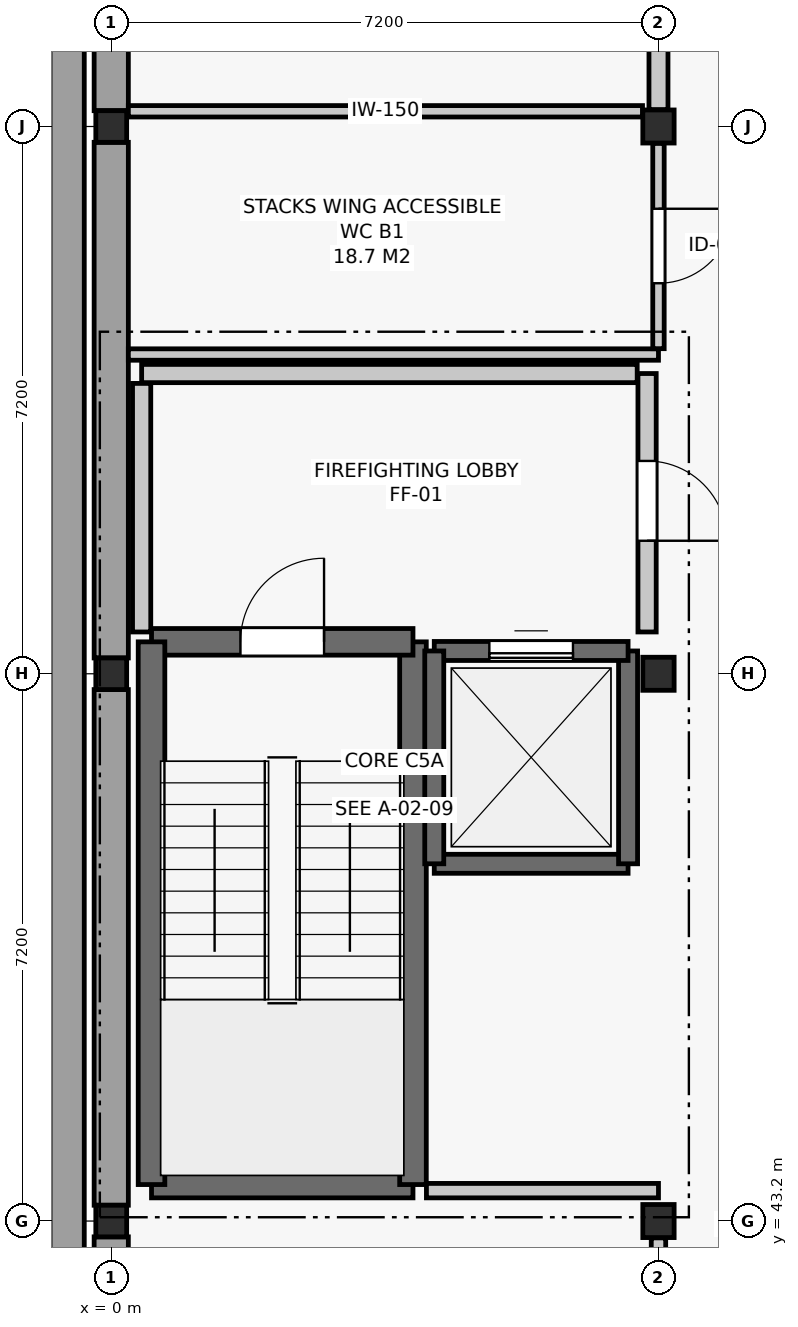
"""IFC4 building model, lengths in metres.
Left out: names, types, materials, properties, quantities, classifications, styles, units other than length and angle.
Written with IfcOpenShell. Run it as: python <this file> out.ifc"""

import sys

from ifc_helpers import new_model, si_unit, direction, frame, frame_2d, origin, origin_2d, place, context, subcontext, project, spatial, rectangle, i_section, extrude, element, fill, save


model = new_model("IFC4")
c1 = context("Model", 3, precision=1e-05, world=origin(), true_north=direction((0.0, 1.0)))
c2 = subcontext(c1, "Body", "Model", "MODEL_VIEW")
j1 = project(units=[si_unit("LENGTHUNIT", "METRE"), si_unit("PLANEANGLEUNIT", "RADIAN")], contexts=[c1])
p1 = place(None, origin())
s1 = spatial("IfcSite", under=j1, at=p1, CompositionType="ELEMENT")
p2 = place(p1, origin())
s2 = spatial("IfcBuilding", under=s1, at=p2, CompositionType="ELEMENT")
p3 = place(p2, frame((0.0, 0.0, -4.2)))
s3 = spatial("IfcBuildingStorey", under=s2, at=p3, CompositionType="ELEMENT", Elevation=-4.2)
for number, where, z_axis, x_axis in (
    (1, (0.0, 43.2, 0.0), (0.0, 0.0, 1.0), (1.0, 0.0, 0.0)),
    (2, (0.0, 50.4, 0.0), (0.0, 0.0, 1.0), (1.0, 0.0, 0.0)),
    (3, (0.0, 57.6, 0.0), (0.0, 0.0, 1.0), (1.0, 0.0, 0.0)),
):
    element("IfcColumn", number, at=place(p3, frame(where, z_axis=z_axis, x_axis=x_axis)), inside=s3, PredefinedType="COLUMN", context=c2, shape_type="SweptSolid", body=[
        extrude(i_section(OverallWidth=0.406, OverallDepth=0.416, WebThickness=0.021, FlangeThickness=0.034, FilletRadius=0.015, at=origin_2d()), origin(), (0.0, 0.0, 1.0), 4.2),
    ])
for number, where, z_axis, x_axis in (
    (4, (7.2, 43.2, 0.0), (0.0, 0.0, 1.0), (1.0, 0.0, 0.0)),
    (5, (7.2, 50.4, 0.0), (0.0, 0.0, 1.0), (1.0, 0.0, 0.0)),
    (6, (7.2, 57.6, 0.0), (0.0, 0.0, 1.0), (1.0, 0.0, 0.0)),
):
    element("IfcColumn", number, at=place(p3, frame(where, z_axis=z_axis, x_axis=x_axis)), inside=s3, PredefinedType="COLUMN", context=c2, shape_type="SweptSolid", body=[
        extrude(i_section(OverallWidth=0.412, OverallDepth=0.435, WebThickness=0.025, FlangeThickness=0.042, FilletRadius=0.015, at=origin_2d()), origin(), (0.0, 0.0, 1.0), 4.2),
    ])
for number, where, z_axis, x_axis in (
    (7, (0.0, 36.208, 0.0), (0.0, 0.0, 1.0), (0.0, 1.0, 0.0)),
    (8, (0.0, 43.408, 0.0), (0.0, 0.0, 1.0), (0.0, 1.0, 0.0)),
):
    element("IfcWall", number, at=place(p3, frame(where, z_axis=z_axis, x_axis=x_axis)), inside=s3, PredefinedType="USERDEFINED", context=c2, shape_type="SweptSolid", body=[
        extrude(rectangle(XDim=6.784, YDim=0.45, at=frame_2d((3.392, 0.0))), origin(), (0.0, 0.0, 1.0), 3.26),
    ])
p4 = place(p3, frame((0.0, 50.608, 0.0), z_axis=(0.0, 0.0, 1.0), x_axis=(0.0, 1.0, 0.0)))
e9 = element("IfcWall", 9, at=p4, inside=s3, PredefinedType="USERDEFINED", context=c2, shape_type="SweptSolid", body=[
    extrude(rectangle(XDim=6.784, YDim=0.45, at=frame_2d((3.392, 0.0))), origin(), (0.0, 0.0, 1.0), 3.26),
])
p5 = place(p3, frame((0.0, 57.808, 0.0), z_axis=(0.0, 0.0, 1.0), x_axis=(0.0, 1.0, 0.0)))
e10 = element("IfcWall", 10, at=p5, inside=s3, PredefinedType="USERDEFINED", context=c2, shape_type="SweptSolid", body=[
    extrude(rectangle(XDim=6.784, YDim=0.45, at=frame_2d((3.392, 0.0))), origin(), (0.0, 0.0, 1.0), 3.26),
])
p6 = place(p3, frame((-0.58, 28.8, -0.6), z_axis=(0.0, 0.0, 1.0), x_axis=(0.0, 1.0, 0.0)))
e11 = element("IfcWall", 11, at=p6, inside=s3, PredefinedType="USERDEFINED", context=c2, shape_type="SweptSolid", body=[
    extrude(rectangle(XDim=79.2, YDim=0.45, at=frame_2d((39.6, 0.0))), origin(), (0.0, 0.0, 1.0), 4.48),
])
p7 = place(p3, frame((0.53, 43.68, 0.0), z_axis=(0.0, 0.0, 1.0), x_axis=(1.0, 0.0, 0.0)))
e12 = element("IfcWall", 12, at=p7, inside=s3, PredefinedType="SHEAR", context=c2, shape_type="SweptSolid", body=[
    extrude(rectangle(XDim=3.44, YDim=0.35, at=frame_2d((1.72, 0.0))), origin(), (0.0, 0.0, 1.0), 3.88),
])
p8 = place(p3, frame((3.97, 43.68, 0.0), z_axis=(0.0, 0.0, 1.0), x_axis=(0.0, 1.0, 0.0)))
e13 = element("IfcWall", 13, at=p8, inside=s3, PredefinedType="SHEAR", context=c2, shape_type="SweptSolid", body=[
    extrude(rectangle(XDim=7.14, YDim=0.35, at=frame_2d((3.57, 0.0))), origin(), (0.0, 0.0, 1.0), 3.88),
])
p9 = place(p3, frame((3.97, 50.82, 0.0), z_axis=(0.0, 0.0, 1.0), x_axis=(-1.0, 0.0, 0.0)))
e14 = element("IfcWall", 14, at=p9, inside=s3, PredefinedType="SHEAR", context=c2, shape_type="SweptSolid", body=[
    extrude(rectangle(XDim=3.44, YDim=0.35, at=frame_2d((1.72, 0.0))), origin(), (0.0, 0.0, 1.0), 3.88),
])
p10 = place(p9, frame((1.17, 0.0, 0.0)))
e15 = element("IfcOpeningElement", 15, at=p10, cuts=e14, PredefinedType="OPENING", context=c2, shape_type="SweptSolid", body=[
    extrude(rectangle(XDim=1.1, YDim=2.15, at=frame_2d((0.55, 1.075))), frame((0.0, 0.187, 0.0), z_axis=(0.0, -1.0, 0.0), x_axis=(1.0, 0.0, 0.0)), (0.0, 0.0, 1.0), 0.374),
])
p11 = place(p3, frame((0.53, 50.82, 0.0), z_axis=(0.0, 0.0, 1.0), x_axis=(0.0, -1.0, 0.0)))
e16 = element("IfcWall", 16, at=p11, inside=s3, PredefinedType="SHEAR", context=c2, shape_type="SweptSolid", body=[
    extrude(rectangle(XDim=7.14, YDim=0.35, at=frame_2d((3.57, 0.0))), origin(), (0.0, 0.0, 1.0), 3.88),
])
p12 = place(p3, frame((7.05, 50.95, 0.0), z_axis=(0.0, 0.0, 1.0), x_axis=(0.0, 1.0, 0.0)))
e17 = element("IfcWall", 17, at=p12, inside=s3, PredefinedType="SOLIDWALL", context=c2, shape_type="SweptSolid", body=[
    extrude(rectangle(XDim=3.4, YDim=0.24, at=frame_2d((1.7, 0.0))), origin(), (0.0, 0.0, 1.0), 3.14),
])
p13 = place(p12, frame((1.2, 0.0, 0.0)))
e18 = element("IfcOpeningElement", 18, at=p13, cuts=e17, PredefinedType="OPENING", context=c2, shape_type="SweptSolid", body=[
    extrude(rectangle(XDim=1.05, YDim=2.15, at=frame_2d((0.525, 1.075))), frame((0.0, 0.132, 0.0), z_axis=(0.0, -1.0, 0.0), x_axis=(1.0, 0.0, 0.0)), (0.0, 0.0, 1.0), 0.264),
])
p14 = place(p3, frame((0.4, 54.35, 0.0), z_axis=(0.0, 0.0, 1.0), x_axis=(1.0, 0.0, 0.0)))
e19 = element("IfcWall", 19, at=p14, inside=s3, PredefinedType="SOLIDWALL", context=c2, shape_type="SweptSolid", body=[
    extrude(rectangle(XDim=6.52, YDim=0.24, at=frame_2d((3.26, 0.0))), origin(), (0.0, 0.0, 1.0), 3.14),
])
p15 = place(p3, frame((0.4, 50.95, 0.0), z_axis=(0.0, 0.0, 1.0), x_axis=(0.0, 1.0, 0.0)))
e20 = element("IfcWall", 20, at=p15, inside=s3, PredefinedType="SOLIDWALL", context=c2, shape_type="SweptSolid", body=[
    extrude(rectangle(XDim=3.27, YDim=0.24, at=frame_2d((1.635, 0.0))), origin(), (0.0, 0.0, 1.0), 3.14),
])
p16 = place(p3, frame((4.25, 47.9, 0.0), z_axis=(0.0, 0.0, 1.0), x_axis=(1.0, 0.0, 0.0)))
e21 = element("IfcWall", 21, at=p16, inside=s3, PredefinedType="SHEAR", context=c2, shape_type="SweptSolid", body=[
    extrude(rectangle(XDim=2.55, YDim=0.25, at=frame_2d((1.275, 0.0))), origin(), (0.0, 0.0, 1.0), 3.88),
])
p17 = place(p3, frame((6.8, 47.9, 0.0), z_axis=(0.0, 0.0, 1.0), x_axis=(0.0, 1.0, 0.0)))
e22 = element("IfcWall", 22, at=p17, inside=s3, PredefinedType="SHEAR", context=c2, shape_type="SweptSolid", body=[
    extrude(rectangle(XDim=2.8, YDim=0.25, at=frame_2d((1.4, 0.0))), origin(), (0.0, 0.0, 1.0), 3.88),
])
p18 = place(p3, frame((6.8, 50.7, 0.0), z_axis=(0.0, 0.0, 1.0), x_axis=(-1.0, 0.0, 0.0)))
e23 = element("IfcWall", 23, at=p18, inside=s3, PredefinedType="SHEAR", context=c2, shape_type="SweptSolid", body=[
    extrude(rectangle(XDim=2.55, YDim=0.25, at=frame_2d((1.275, 0.0))), origin(), (0.0, 0.0, 1.0), 3.88),
])
p19 = place(p18, frame((0.725, 0.0, 0.0)))
e24 = element("IfcOpeningElement", 24, at=p19, cuts=e23, PredefinedType="OPENING", context=c2, shape_type="SweptSolid", body=[
    extrude(rectangle(XDim=1.1, YDim=2.1, at=frame_2d((0.55, 1.05))), frame((0.0, 0.137, 0.0), z_axis=(0.0, -1.0, 0.0), x_axis=(1.0, 0.0, 0.0)), (0.0, 0.0, 1.0), 0.274),
])
p20 = place(p3, frame((4.25, 50.7, 0.0), z_axis=(0.0, 0.0, 1.0), x_axis=(0.0, -1.0, 0.0)))
e25 = element("IfcWall", 25, at=p20, inside=s3, PredefinedType="SHEAR", context=c2, shape_type="SweptSolid", body=[
    extrude(rectangle(XDim=2.8, YDim=0.25, at=frame_2d((1.4, 0.0))), origin(), (0.0, 0.0, 1.0), 3.88),
])
p21 = place(p3, frame((0.225, 54.6, 0.0), z_axis=(0.0, 0.0, 1.0), x_axis=(1.0, 0.0, 0.0)))
e26 = element("IfcWall", 26, at=p21, inside=s3, PredefinedType="PARTITIONING", context=c2, shape_type="SweptSolid", body=[
    extrude(rectangle(XDim=6.975, YDim=0.15, at=frame_2d((3.487, 0.0))), origin(), (0.0, 0.0, 1.0), 3.175),
])
p22 = place(p3, frame((0.225, 57.8, 0.0), z_axis=(0.0, 0.0, 1.0), x_axis=(1.0, 0.0, 0.0)))
e27 = element("IfcWall", 27, at=p22, inside=s3, PredefinedType="PARTITIONING", context=c2, shape_type="SweptSolid", body=[
    extrude(rectangle(XDim=6.765, YDim=0.15, at=frame_2d((3.382, 0.0))), origin(), (0.0, 0.0, 1.0), 3.215),
])
p23 = place(p3, frame((4.147, 43.6, 0.0), z_axis=(0.0, 0.0, 1.0), x_axis=(1.0, 0.0, 0.0)))
e28 = element("IfcWall", 28, at=p23, inside=s3, PredefinedType="PARTITIONING", context=c2, shape_type="SweptSolid", body=[
    extrude(rectangle(XDim=3.053, YDim=0.19, at=frame_2d((1.526, 0.0))), origin(), (0.0, 0.0, 1.0), 3.175),
])
p24 = place(p3, frame((7.2, 54.677, 0.0), z_axis=(0.0, 0.0, 1.0), x_axis=(0.0, 1.0, 0.0)))
e29 = element("IfcWall", 29, at=p24, inside=s3, PredefinedType="PARTITIONING", context=c2, shape_type="SweptSolid", body=[
    extrude(rectangle(XDim=2.701, YDim=0.15, at=frame_2d((1.351, 0.0))), origin(), (0.0, 0.0, 1.0), 3.175),
])
p25 = place(p24, frame((0.861, 0.0, 0.0)))
e30 = element("IfcOpeningElement", 30, at=p25, cuts=e29, PredefinedType="OPENING", context=c2, shape_type="SweptSolid", body=[
    extrude(rectangle(XDim=0.98, YDim=2.1, at=frame_2d((0.49, 1.05))), frame((0.0, 0.087, 0.0), z_axis=(0.0, -1.0, 0.0), x_axis=(1.0, 0.0, 0.0)), (0.0, 0.0, 1.0), 0.174),
])
p26 = place(p3, frame((7.2, 57.822, 0.0), z_axis=(0.0, 0.0, 1.0), x_axis=(0.0, 1.0, 0.0)))
e31 = element("IfcWall", 31, at=p26, inside=s3, PredefinedType="SOLIDWALL", context=c2, shape_type="SweptSolid", body=[
    extrude(rectangle(XDim=6.757, YDim=0.25, at=frame_2d((3.378, 0.0))), origin(), (0.0, 0.0, 1.0), 3.175),
])
p27 = place(p26, frame((2.628, 0.0, 0.0)))
e32 = element("IfcOpeningElement", 32, at=p27, cuts=e31, PredefinedType="OPENING", context=c2, shape_type="SweptSolid", body=[
    extrude(rectangle(XDim=1.5, YDim=2.2, at=frame_2d((0.75, 1.1))), frame((0.0, 0.137, 0.0), z_axis=(0.0, -1.0, 0.0), x_axis=(1.0, 0.0, 0.0)), (0.0, 0.0, 1.0), 0.274),
])
p28 = place(p3, frame((7.2, 36.221, 0.0), z_axis=(0.0, 0.0, 1.0), x_axis=(0.0, 1.0, 0.0)))
e33 = element("IfcWall", 33, at=p28, inside=s3, PredefinedType="PARTITIONING", context=c2, shape_type="SweptSolid", body=[
    extrude(rectangle(XDim=6.757, YDim=0.19, at=frame_2d((3.378, 0.0))), origin(), (0.0, 0.0, 1.0), 3.175),
])
p29 = place(p28, frame((2.803, 0.0, 0.0)))
e34 = element("IfcOpeningElement", 34, at=p29, cuts=e33, PredefinedType="OPENING", context=c2, shape_type="SweptSolid", body=[
    extrude(rectangle(XDim=1.15, YDim=2.2, at=frame_2d((0.575, 1.1))), frame((0.0, 0.107, 0.0), z_axis=(0.0, -1.0, 0.0), x_axis=(1.0, 0.0, 0.0)), (0.0, 0.0, 1.0), 0.214),
])
p30 = place(p10, frame((1.1, 0.0, 0.0), z_axis=(0.0, 0.0, 1.0), x_axis=(-1.0, 0.0, 0.0)))
e35 = element("IfcDoor", 35, at=p30, inside=s3, OperationType="SINGLE_SWING_RIGHT", PredefinedType="DOOR", context=c2, shape_type="SweptSolid", body=[
    extrude(rectangle(XDim=1.1, YDim=2.15, at=frame_2d((0.55, 1.075))), frame((0.0, 0.025, 0.0), z_axis=(0.0, -1.0, 0.0), x_axis=(1.0, 0.0, 0.0)), (0.0, 0.0, 1.0), 0.05),
])
fill(e15, e35)
p31 = place(p13, frame((1.05, 0.0, 0.0), z_axis=(0.0, 0.0, 1.0), x_axis=(-1.0, 0.0, 0.0)))
e36 = element("IfcDoor", 36, at=p31, inside=s3, OperationType="SINGLE_SWING_RIGHT", PredefinedType="DOOR", context=c2, shape_type="SweptSolid", body=[
    extrude(rectangle(XDim=1.05, YDim=2.15, at=frame_2d((0.525, 1.075))), frame((0.0, 0.025, 0.0), z_axis=(0.0, -1.0, 0.0), x_axis=(1.0, 0.0, 0.0)), (0.0, 0.0, 1.0), 0.05),
])
fill(e18, e36)
p32 = place(p19, origin())
e37 = element("IfcDoor", 37, at=p32, inside=s3, OperationType="SLIDING_TO_RIGHT", PredefinedType="DOOR", context=c2, shape_type="SweptSolid", body=[
    extrude(rectangle(XDim=1.1, YDim=2.1, at=frame_2d((0.55, 1.05))), frame((0.0, 0.025, 0.0), z_axis=(0.0, -1.0, 0.0), x_axis=(1.0, 0.0, 0.0)), (0.0, 0.0, 1.0), 0.05),
])
fill(e24, e37)
p33 = place(p25, frame((0.98, 0.0, 0.0), z_axis=(0.0, 0.0, 1.0), x_axis=(-1.0, 0.0, 0.0)))
e38 = element("IfcDoor", 38, at=p33, inside=s3, OperationType="SINGLE_SWING_LEFT", PredefinedType="DOOR", context=c2, shape_type="SweptSolid", body=[
    extrude(rectangle(XDim=0.98, YDim=2.1, at=frame_2d((0.49, 1.05))), frame((0.0, 0.025, 0.0), z_axis=(0.0, -1.0, 0.0), x_axis=(1.0, 0.0, 0.0)), (0.0, 0.0, 1.0), 0.05),
])
fill(e30, e38)
save(model, sys.argv[1])
